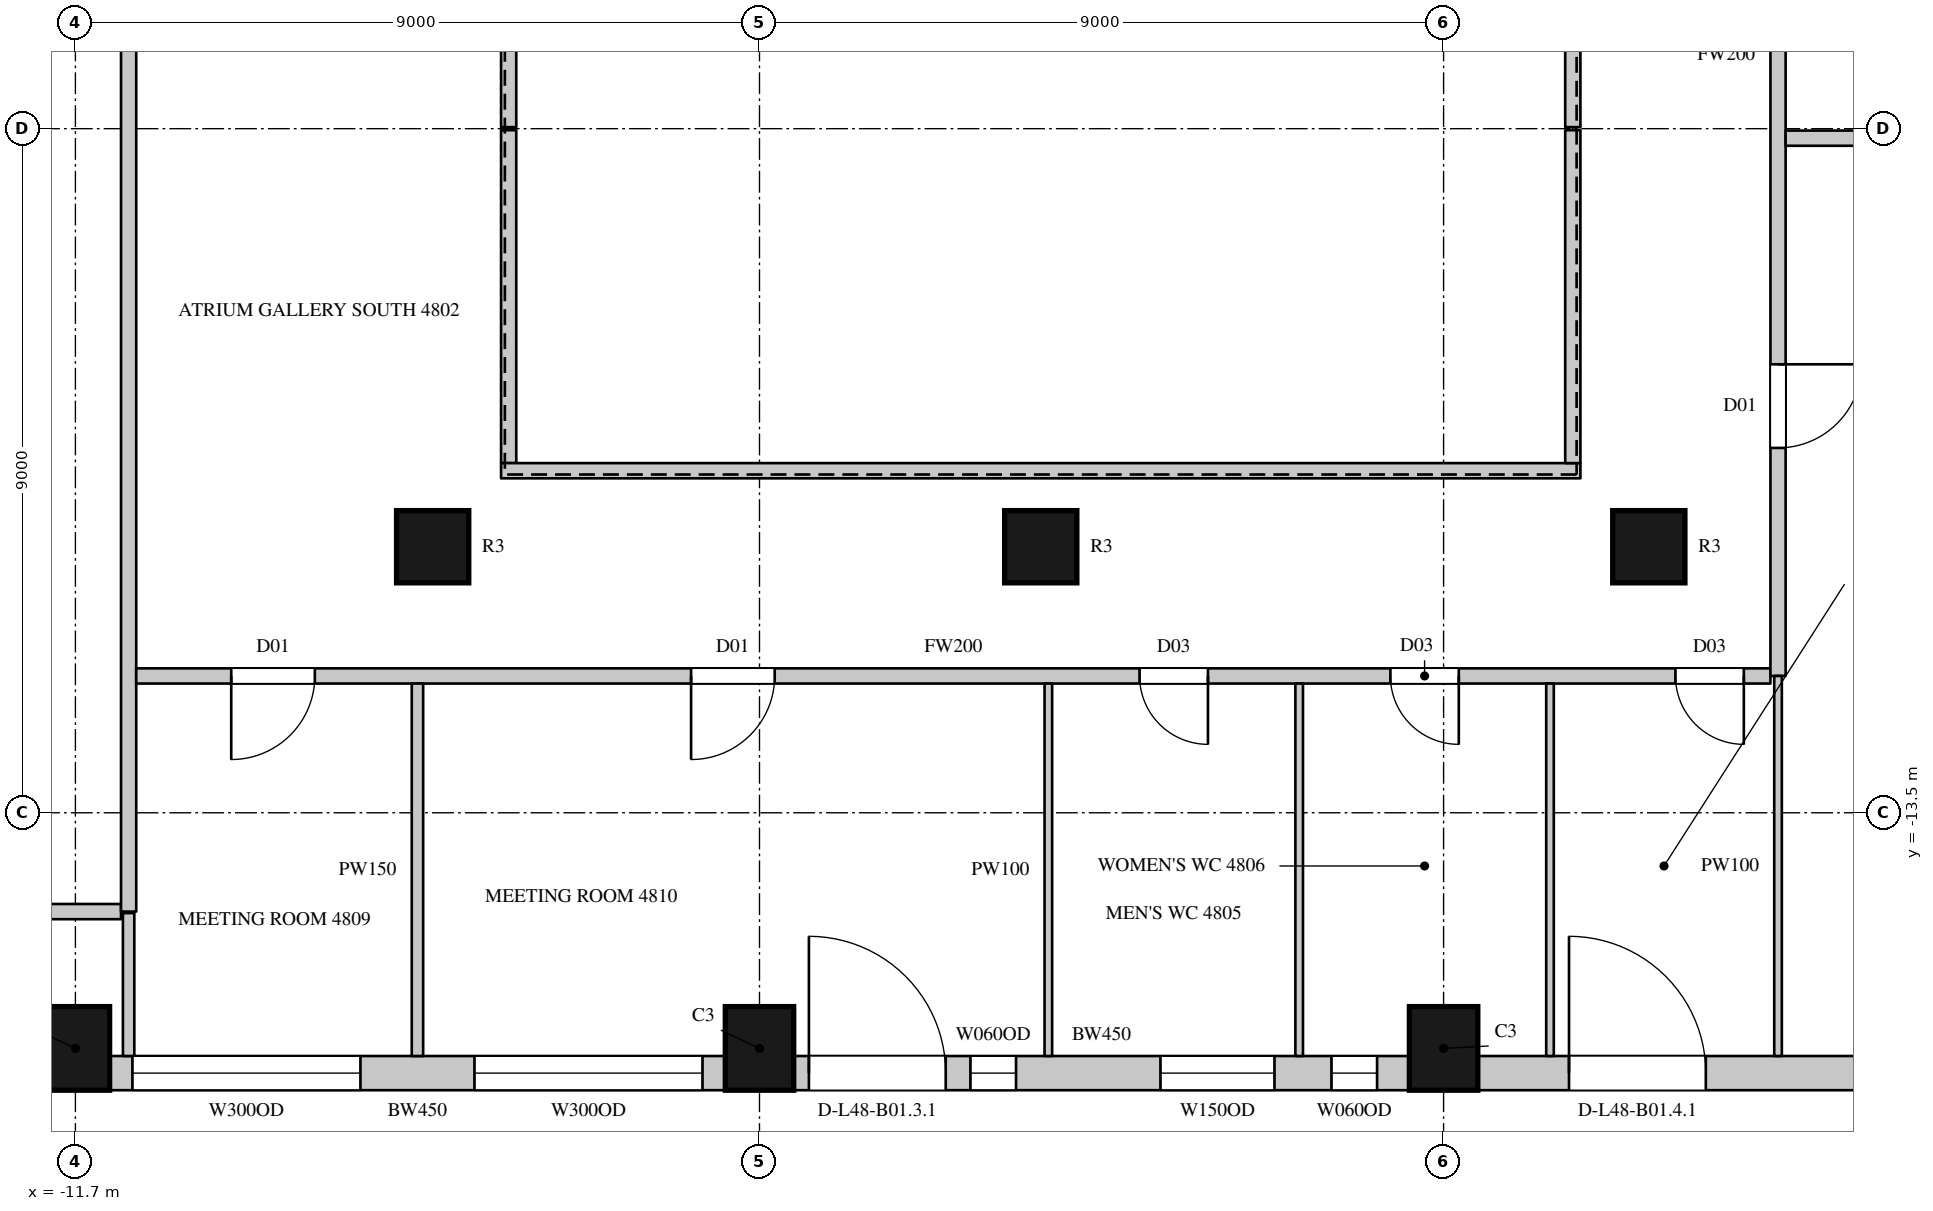
"""IFC4 building model, lengths in metres.
Left out: names, types, materials, properties, quantities, classifications, styles, units other than length and angle.
Written with IfcOpenShell. Run it as: python <this file> out.ifc"""

import sys

from ifc_helpers import new_model, si_unit, direction, frame, frame_2d, origin, origin_2d, place, context, subcontext, project, spatial, rectangle, circle, extrude, element, fill, save


model = new_model("IFC4")
c1 = context("Model", 3, precision=1e-05, world=origin(), true_north=direction((0.0, 1.0)))
c2 = subcontext(c1, "Body", "Model", "MODEL_VIEW")
j1 = project(units=[si_unit("LENGTHUNIT", "METRE"), si_unit("PLANEANGLEUNIT", "RADIAN")], contexts=[c1])
p1 = place(None, origin())
s1 = spatial("IfcSite", under=j1, at=p1, CompositionType="ELEMENT")
p2 = place(p1, origin())
s2 = spatial("IfcBuilding", under=s1, at=p2, CompositionType="ELEMENT")
p3 = place(p2, frame((0.0, 0.0, 217.9)))
s3 = spatial("IfcBuildingStorey", under=s2, at=p3, CompositionType="ELEMENT", Elevation=217.9)
for number, where, z_axis, x_axis in (
    (1, (-11.7, -16.6, 0.0), (0.0, 0.0, 1.0), (1.0, 0.0, 0.0)),
    (2, (-2.7, -16.6, 0.0), (0.0, 0.0, 1.0), (1.0, 0.0, 0.0)),
    (3, (6.3, -16.6, 0.0), (0.0, 0.0, 1.0), (1.0, 0.0, 0.0)),
):
    element("IfcColumn", number, at=place(p3, frame(where, z_axis=z_axis, x_axis=x_axis)), inside=s3, PredefinedType="COLUMN", context=c2, shape_type="SweptSolid", body=[
        extrude(rectangle(XDim=0.9, YDim=1.1, at=origin_2d()), origin(), (0.0, 0.0, 1.0), 4.1),
    ])
for number, where, z_axis, x_axis in (
    (4, (-7.0, -10.0, 0.0), (0.0, 0.0, 1.0), (1.0, 0.0, 0.0)),
    (5, (1.0, -10.0, 0.0), (0.0, 0.0, 1.0), (1.0, 0.0, 0.0)),
    (6, (9.0, -10.0, 0.0), (0.0, 0.0, 1.0), (1.0, 0.0, 0.0)),
):
    element("IfcColumn", number, at=place(p3, frame(where, z_axis=z_axis, x_axis=x_axis)), inside=s3, PredefinedType="COLUMN", context=c2, shape_type="SweptSolid", body=[
        extrude(circle(Radius=0.475, at=origin_2d()), origin(), (0.0, 0.0, 1.0), 4.1),
    ])
p4 = place(p3, frame((-11.25, -16.925, 0.0), z_axis=(0.0, 0.0, 1.0), x_axis=(1.0, 0.0, 0.0)))
e7 = element("IfcWall", 7, at=p4, inside=s3, PredefinedType="SOLIDWALL", context=c2, shape_type="SweptSolid", body=[
    extrude(rectangle(XDim=8.1, YDim=0.45, at=frame_2d((4.05, 0.0))), origin(), (0.0, 0.0, 1.0), 3.8),
])
p5 = place(p4, frame((0.3, 0.0, 1.05)))
e8 = element("IfcOpeningElement", 8, at=p5, cuts=e7, PredefinedType="OPENING", context=c2, shape_type="SweptSolid", body=[
    extrude(rectangle(XDim=3.0, YDim=2.4, at=frame_2d((1.5, 1.2))), frame((0.0, 0.235, 0.0), z_axis=(0.0, -1.0, 0.0), x_axis=(1.0, 0.0, 0.0)), (0.0, 0.0, 1.0), 0.47),
])
p6 = place(p4, frame((4.8, 0.0, 1.05)))
e9 = element("IfcOpeningElement", 9, at=p6, cuts=e7, PredefinedType="OPENING", context=c2, shape_type="SweptSolid", body=[
    extrude(rectangle(XDim=3.0, YDim=2.4, at=frame_2d((1.5, 1.2))), frame((0.0, 0.235, 0.0), z_axis=(0.0, -1.0, 0.0), x_axis=(1.0, 0.0, 0.0)), (0.0, 0.0, 1.0), 0.47),
])
p7 = place(p3, frame((-2.25, -16.925, 0.0), z_axis=(0.0, 0.0, 1.0), x_axis=(1.0, 0.0, 0.0)))
e10 = element("IfcWall", 10, at=p7, inside=s3, PredefinedType="SOLIDWALL", context=c2, shape_type="SweptSolid", body=[
    extrude(rectangle(XDim=8.1, YDim=0.45, at=frame_2d((4.05, 0.0))), origin(), (0.0, 0.0, 1.0), 3.8),
])
p8 = place(p7, frame((0.2, 0.0, 0.0)))
e11 = element("IfcOpeningElement", 11, at=p8, cuts=e10, PredefinedType="OPENING", context=c2, shape_type="SweptSolid", body=[
    extrude(rectangle(XDim=1.8, YDim=2.4, at=frame_2d((0.9, 1.2))), frame((0.0, 0.235, 0.0), z_axis=(0.0, -1.0, 0.0), x_axis=(1.0, 0.0, 0.0)), (0.0, 0.0, 1.0), 0.47),
])
p9 = place(p7, frame((2.325, 0.0, 1.05)))
e12 = element("IfcOpeningElement", 12, at=p9, cuts=e10, PredefinedType="OPENING", context=c2, shape_type="SweptSolid", body=[
    extrude(rectangle(XDim=0.6, YDim=2.4, at=frame_2d((0.3, 1.2))), frame((0.0, 0.235, 0.0), z_axis=(0.0, -1.0, 0.0), x_axis=(1.0, 0.0, 0.0)), (0.0, 0.0, 1.0), 0.47),
])
p10 = place(p7, frame((4.825, 0.0, 1.05)))
e13 = element("IfcOpeningElement", 13, at=p10, cuts=e10, PredefinedType="OPENING", context=c2, shape_type="SweptSolid", body=[
    extrude(rectangle(XDim=1.5, YDim=2.4, at=frame_2d((0.75, 1.2))), frame((0.0, 0.235, 0.0), z_axis=(0.0, -1.0, 0.0), x_axis=(1.0, 0.0, 0.0)), (0.0, 0.0, 1.0), 0.47),
])
p11 = place(p7, frame((7.075, 0.0, 1.05)))
e14 = element("IfcOpeningElement", 14, at=p11, cuts=e10, PredefinedType="OPENING", context=c2, shape_type="SweptSolid", body=[
    extrude(rectangle(XDim=0.6, YDim=2.4, at=frame_2d((0.3, 1.2))), frame((0.0, 0.235, 0.0), z_axis=(0.0, -1.0, 0.0), x_axis=(1.0, 0.0, 0.0)), (0.0, 0.0, 1.0), 0.47),
])
p12 = place(p3, frame((6.75, -16.925, 0.0), z_axis=(0.0, 0.0, 1.0), x_axis=(1.0, 0.0, 0.0)))
e15 = element("IfcWall", 15, at=p12, inside=s3, PredefinedType="SOLIDWALL", context=c2, shape_type="SweptSolid", body=[
    extrude(rectangle(XDim=6.414, YDim=0.45, at=frame_2d((3.207, 0.0))), origin(), (0.0, 0.0, 1.0), 3.8),
])
p13 = place(p12, frame((1.2, 0.0, 0.0)))
e16 = element("IfcOpeningElement", 16, at=p13, cuts=e15, PredefinedType="OPENING", context=c2, shape_type="SweptSolid", body=[
    extrude(rectangle(XDim=1.8, YDim=2.4, at=frame_2d((0.9, 1.2))), frame((0.0, 0.235, 0.0), z_axis=(0.0, -1.0, 0.0), x_axis=(1.0, 0.0, 0.0)), (0.0, 0.0, 1.0), 0.47),
])
p14 = place(p3, frame((-13.97, -14.8, 0.0), z_axis=(0.0, 0.0, 1.0), x_axis=(1.0, 0.0, 0.0)))
e17 = element("IfcWall", 17, at=p14, inside=s3, PredefinedType="PARTITIONING", context=c2, shape_type="SweptSolid", body=[
    extrude(rectangle(XDim=2.87, YDim=0.2, at=frame_2d((1.435, 0.0))), origin(), (0.0, 0.0, 1.0), 3.8),
])
p15 = place(p3, frame((-11.0, -14.8, 0.0), z_axis=(0.0, 0.0, 1.0), x_axis=(0.0, 1.0, 0.0)))
e18 = element("IfcWall", 18, at=p15, inside=s3, PredefinedType="PARTITIONING", context=c2, shape_type="SweptSolid", body=[
    extrude(rectangle(XDim=29.6, YDim=0.2, at=frame_2d((14.8, 0.0))), origin(), (0.0, 0.0, 1.0), 3.8),
])
p16 = place(p15, frame((17.9, 0.0, 0.0)))
e19 = element("IfcOpeningElement", 19, at=p16, cuts=e18, PredefinedType="OPENING", context=c2, shape_type="SweptSolid", body=[
    extrude(rectangle(XDim=1.5, YDim=2.4, at=frame_2d((0.75, 1.2))), frame((0.0, 0.11, 0.0), z_axis=(0.0, -1.0, 0.0), x_axis=(1.0, 0.0, 0.0)), (0.0, 0.0, 1.0), 0.22),
])
p17 = place(p3, frame((-10.9, -11.7, 0.0), z_axis=(0.0, 0.0, 1.0), x_axis=(1.0, 0.0, 0.0)))
e20 = element("IfcWall", 20, at=p17, inside=s3, PredefinedType="PARTITIONING", context=c2, shape_type="SweptSolid", body=[
    extrude(rectangle(XDim=21.5, YDim=0.2, at=frame_2d((10.75, 0.0))), origin(), (0.0, 0.0, 1.0), 3.8),
])
p18 = place(p17, frame((13.2, 0.0, 0.0)))
e21 = element("IfcOpeningElement", 21, at=p18, cuts=e20, PredefinedType="OPENING", context=c2, shape_type="SweptSolid", body=[
    extrude(rectangle(XDim=0.9, YDim=2.2, at=frame_2d((0.45, 1.1))), frame((0.0, 0.11, 0.0), z_axis=(0.0, -1.0, 0.0), x_axis=(1.0, 0.0, 0.0)), (0.0, 0.0, 1.0), 0.22),
])
p19 = place(p17, frame((16.5, 0.0, 0.0)))
e22 = element("IfcOpeningElement", 22, at=p19, cuts=e20, PredefinedType="OPENING", context=c2, shape_type="SweptSolid", body=[
    extrude(rectangle(XDim=0.9, YDim=2.2, at=frame_2d((0.45, 1.1))), frame((0.0, 0.11, 0.0), z_axis=(0.0, -1.0, 0.0), x_axis=(1.0, 0.0, 0.0)), (0.0, 0.0, 1.0), 0.22),
])
p20 = place(p17, frame((20.25, 0.0, 0.0)))
e23 = element("IfcOpeningElement", 23, at=p20, cuts=e20, PredefinedType="OPENING", context=c2, shape_type="SweptSolid", body=[
    extrude(rectangle(XDim=0.9, YDim=2.2, at=frame_2d((0.45, 1.1))), frame((0.0, 0.11, 0.0), z_axis=(0.0, -1.0, 0.0), x_axis=(1.0, 0.0, 0.0)), (0.0, 0.0, 1.0), 0.22),
])
p21 = place(p17, frame((1.25, 0.0, 0.0)))
e24 = element("IfcOpeningElement", 24, at=p21, cuts=e20, PredefinedType="OPENING", context=c2, shape_type="SweptSolid", body=[
    extrude(rectangle(XDim=1.1, YDim=2.4, at=frame_2d((0.55, 1.2))), frame((0.0, 0.11, 0.0), z_axis=(0.0, -1.0, 0.0), x_axis=(1.0, 0.0, 0.0)), (0.0, 0.0, 1.0), 0.22),
])
p22 = place(p17, frame((7.3, 0.0, 0.0)))
e25 = element("IfcOpeningElement", 25, at=p22, cuts=e20, PredefinedType="OPENING", context=c2, shape_type="SweptSolid", body=[
    extrude(rectangle(XDim=1.1, YDim=2.4, at=frame_2d((0.55, 1.2))), frame((0.0, 0.11, 0.0), z_axis=(0.0, -1.0, 0.0), x_axis=(1.0, 0.0, 0.0)), (0.0, 0.0, 1.0), 0.22),
])
p23 = place(p3, frame((-6.0, -8.9, 0.0), z_axis=(0.0, 0.0, 1.0), x_axis=(0.0, 1.0, 0.0)))
e26 = element("IfcWall", 26, at=p23, inside=s3, PredefinedType="PARTITIONING", context=c2, shape_type="SweptSolid", body=[
    extrude(rectangle(XDim=4.38, YDim=0.2, at=frame_2d((2.19, 0.0))), origin(), (0.0, 0.0, 1.0), 3.8),
])
p24 = place(p3, frame((-6.1, -9.0, 0.0), z_axis=(0.0, 0.0, 1.0), x_axis=(1.0, 0.0, 0.0)))
e27 = element("IfcWall", 27, at=p24, inside=s3, PredefinedType="PARTITIONING", context=c2, shape_type="SweptSolid", body=[
    extrude(rectangle(XDim=14.2, YDim=0.2, at=frame_2d((7.1, 0.0))), origin(), (0.0, 0.0, 1.0), 3.8),
])
p25 = place(p3, frame((-6.0, -4.48, 0.0), z_axis=(0.0, 0.0, 1.0), x_axis=(0.0, 1.0, 0.0)))
e28 = element("IfcWall", 28, at=p25, inside=s3, PredefinedType="PARTITIONING", context=c2, shape_type="SweptSolid", body=[
    extrude(rectangle(XDim=13.38, YDim=0.2, at=frame_2d((6.69, 0.0))), origin(), (0.0, 0.0, 1.0), 3.8),
])
p26 = place(p3, frame((8.0, -8.9, 0.0), z_axis=(0.0, 0.0, 1.0), x_axis=(0.0, 1.0, 0.0)))
e29 = element("IfcWall", 29, at=p26, inside=s3, PredefinedType="PARTITIONING", context=c2, shape_type="SweptSolid", body=[
    extrude(rectangle(XDim=4.38, YDim=0.2, at=frame_2d((2.19, 0.0))), origin(), (0.0, 0.0, 1.0), 3.8),
])
p27 = place(p3, frame((8.0, -4.48, 0.0), z_axis=(0.0, 0.0, 1.0), x_axis=(0.0, 1.0, 0.0)))
e30 = element("IfcWall", 30, at=p27, inside=s3, PredefinedType="PARTITIONING", context=c2, shape_type="SweptSolid", body=[
    extrude(rectangle(XDim=13.38, YDim=0.2, at=frame_2d((6.69, 0.0))), origin(), (0.0, 0.0, 1.0), 3.8),
])
p28 = place(p3, frame((10.7, -11.7, 0.0), z_axis=(0.0, 0.0, 1.0), x_axis=(0.0, 1.0, 0.0)))
e31 = element("IfcWall", 31, at=p28, inside=s3, PredefinedType="PARTITIONING", context=c2, shape_type="SweptSolid", body=[
    extrude(rectangle(XDim=16.345, YDim=0.2, at=frame_2d((8.172, 0.0))), origin(), (0.0, 0.0, 1.0), 3.8),
])
p29 = place(p28, frame((12.35, 0.0, 0.0)))
e32 = element("IfcOpeningElement", 32, at=p29, cuts=e31, PredefinedType="OPENING", context=c2, shape_type="SweptSolid", body=[
    extrude(rectangle(XDim=1.5, YDim=2.4, at=frame_2d((0.75, 1.2))), frame((0.0, 0.11, 0.0), z_axis=(0.0, -1.0, 0.0), x_axis=(1.0, 0.0, 0.0)), (0.0, 0.0, 1.0), 0.22),
])
p30 = place(p28, frame((3.0, 0.0, 0.0)))
e33 = element("IfcOpeningElement", 33, at=p30, cuts=e31, PredefinedType="OPENING", context=c2, shape_type="SweptSolid", body=[
    extrude(rectangle(XDim=1.1, YDim=2.4, at=frame_2d((0.55, 1.2))), frame((0.0, 0.11, 0.0), z_axis=(0.0, -1.0, 0.0), x_axis=(1.0, 0.0, 0.0)), (0.0, 0.0, 1.0), 0.22),
])
p31 = place(p3, frame((10.8, -4.625, 0.0), z_axis=(0.0, 0.0, 1.0), x_axis=(1.0, 0.0, 0.0)))
e34 = element("IfcWall", 34, at=p31, inside=s3, PredefinedType="PARTITIONING", context=c2, shape_type="SweptSolid", body=[
    extrude(rectangle(XDim=3.875, YDim=0.2, at=frame_2d((1.938, 0.0))), origin(), (0.0, 0.0, 1.0), 3.8),
])
p32 = place(p3, frame((-11.0, -16.7, 0.0), z_axis=(0.0, 0.0, 1.0), x_axis=(0.0, 1.0, 0.0)))
e35 = element("IfcWall", 35, at=p32, inside=s3, PredefinedType="PARTITIONING", context=c2, shape_type="SweptSolid", body=[
    extrude(rectangle(XDim=1.88, YDim=0.15, at=frame_2d((0.94, 0.0))), origin(), (0.0, 0.0, 1.0), 3.8),
])
p33 = place(p3, frame((-7.2, -16.7, 0.0), z_axis=(0.0, 0.0, 1.0), x_axis=(0.0, 1.0, 0.0)))
e36 = element("IfcWall", 36, at=p33, inside=s3, PredefinedType="PARTITIONING", context=c2, shape_type="SweptSolid", body=[
    extrude(rectangle(XDim=4.9, YDim=0.15, at=frame_2d((2.45, 0.0))), origin(), (0.0, 0.0, 1.0), 3.15),
])
for number, where, z_axis, x_axis in (
    (37, (1.1, -16.7, 0.0), (0.0, 0.0, 1.0), (0.0, 1.0, 0.0)),
    (38, (4.4, -16.7, 0.0), (0.0, 0.0, 1.0), (0.0, 1.0, 0.0)),
    (39, (7.7, -16.7, 0.0), (0.0, 0.0, 1.0), (0.0, 1.0, 0.0)),
):
    element("IfcWall", number, at=place(p3, frame(where, z_axis=z_axis, x_axis=x_axis)), inside=s3, PredefinedType="PARTITIONING", context=c2, shape_type="SweptSolid", body=[
        extrude(rectangle(XDim=4.9, YDim=0.1, at=frame_2d((2.45, 0.0))), origin(), (0.0, 0.0, 1.0), 3.8),
    ])
p34 = place(p3, frame((10.7, -16.7, 0.0), z_axis=(0.0, 0.0, 1.0), x_axis=(0.0, 1.0, 0.0)))
e40 = element("IfcWall", 40, at=p34, inside=s3, PredefinedType="PARTITIONING", context=c2, shape_type="SweptSolid", body=[
    extrude(rectangle(XDim=5.0, YDim=0.1, at=frame_2d((2.5, 0.0))), origin(), (0.0, 0.0, 1.0), 3.8),
])
p35 = place(p5, origin())
e41 = element("IfcWindow", 41, at=p35, inside=s3, PartitioningType="SINGLE_PANEL", PredefinedType="WINDOW", context=c2, shape_type="SweptSolid", body=[
    extrude(rectangle(XDim=3.0, YDim=2.4, at=frame_2d((1.5, 1.2))), frame((0.0, 0.135, 0.0), z_axis=(0.0, -1.0, 0.0), x_axis=(1.0, 0.0, 0.0)), (0.0, 0.0, 1.0), 0.06),
])
fill(e8, e41)
p36 = place(p6, origin())
e42 = element("IfcWindow", 42, at=p36, inside=s3, PartitioningType="SINGLE_PANEL", PredefinedType="WINDOW", context=c2, shape_type="SweptSolid", body=[
    extrude(rectangle(XDim=3.0, YDim=2.4, at=frame_2d((1.5, 1.2))), frame((0.0, 0.135, 0.0), z_axis=(0.0, -1.0, 0.0), x_axis=(1.0, 0.0, 0.0)), (0.0, 0.0, 1.0), 0.06),
])
fill(e9, e42)
p37 = place(p8, origin())
e43 = element("IfcDoor", 43, at=p37, inside=s3, OperationType="SLIDING_TO_LEFT", PredefinedType="DOOR", context=c2, shape_type="SweptSolid", body=[
    extrude(rectangle(XDim=1.8, YDim=2.4, at=frame_2d((0.9, 1.2))), frame((0.0, 0.13, 0.0), z_axis=(0.0, -1.0, 0.0), x_axis=(1.0, 0.0, 0.0)), (0.0, 0.0, 1.0), 0.05),
])
fill(e11, e43)
p38 = place(p13, origin())
e44 = element("IfcDoor", 44, at=p38, inside=s3, OperationType="SLIDING_TO_LEFT", PredefinedType="DOOR", context=c2, shape_type="SweptSolid", body=[
    extrude(rectangle(XDim=1.8, YDim=2.4, at=frame_2d((0.9, 1.2))), frame((0.0, 0.13, 0.0), z_axis=(0.0, -1.0, 0.0), x_axis=(1.0, 0.0, 0.0)), (0.0, 0.0, 1.0), 0.05),
])
fill(e16, e44)
p39 = place(p18, origin())
e45 = element("IfcDoor", 45, at=p39, inside=s3, OperationType="SINGLE_SWING_LEFT", PredefinedType="DOOR", context=c2, shape_type="SweptSolid", body=[
    extrude(rectangle(XDim=0.9, YDim=2.2, at=frame_2d((0.45, 1.1))), frame((0.0, 0.025, 0.0), z_axis=(0.0, -1.0, 0.0), x_axis=(1.0, 0.0, 0.0)), (0.0, 0.0, 1.0), 0.05),
])
fill(e21, e45)
p40 = place(p19, origin())
e46 = element("IfcDoor", 46, at=p40, inside=s3, OperationType="SINGLE_SWING_LEFT", PredefinedType="DOOR", context=c2, shape_type="SweptSolid", body=[
    extrude(rectangle(XDim=0.9, YDim=2.2, at=frame_2d((0.45, 1.1))), frame((0.0, 0.025, 0.0), z_axis=(0.0, -1.0, 0.0), x_axis=(1.0, 0.0, 0.0)), (0.0, 0.0, 1.0), 0.05),
])
fill(e22, e46)
p41 = place(p20, origin())
e47 = element("IfcDoor", 47, at=p41, inside=s3, OperationType="SINGLE_SWING_LEFT", PredefinedType="DOOR", context=c2, shape_type="SweptSolid", body=[
    extrude(rectangle(XDim=0.9, YDim=2.2, at=frame_2d((0.45, 1.1))), frame((0.0, 0.025, 0.0), z_axis=(0.0, -1.0, 0.0), x_axis=(1.0, 0.0, 0.0)), (0.0, 0.0, 1.0), 0.05),
])
fill(e23, e47)
p42 = place(p21, origin())
e48 = element("IfcDoor", 48, at=p42, inside=s3, OperationType="SINGLE_SWING_RIGHT", PredefinedType="DOOR", context=c2, shape_type="SweptSolid", body=[
    extrude(rectangle(XDim=1.1, YDim=2.4, at=frame_2d((0.55, 1.2))), frame((0.0, 0.025, 0.0), z_axis=(0.0, -1.0, 0.0), x_axis=(1.0, 0.0, 0.0)), (0.0, 0.0, 1.0), 0.05),
])
fill(e24, e48)
p43 = place(p22, origin())
e49 = element("IfcDoor", 49, at=p43, inside=s3, OperationType="SINGLE_SWING_RIGHT", PredefinedType="DOOR", context=c2, shape_type="SweptSolid", body=[
    extrude(rectangle(XDim=1.1, YDim=2.4, at=frame_2d((0.55, 1.2))), frame((0.0, 0.025, 0.0), z_axis=(0.0, -1.0, 0.0), x_axis=(1.0, 0.0, 0.0)), (0.0, 0.0, 1.0), 0.05),
])
fill(e25, e49)
p44 = place(p30, origin())
e50 = element("IfcDoor", 50, at=p44, inside=s3, OperationType="SINGLE_SWING_LEFT", PredefinedType="DOOR", context=c2, shape_type="SweptSolid", body=[
    extrude(rectangle(XDim=1.1, YDim=2.4, at=frame_2d((0.55, 1.2))), frame((0.0, 0.025, 0.0), z_axis=(0.0, -1.0, 0.0), x_axis=(1.0, 0.0, 0.0)), (0.0, 0.0, 1.0), 0.05),
])
fill(e33, e50)
p45 = place(p9, origin())
e51 = element("IfcWindow", 51, at=p45, inside=s3, PartitioningType="SINGLE_PANEL", PredefinedType="WINDOW", context=c2, shape_type="SweptSolid", body=[
    extrude(rectangle(XDim=0.6, YDim=2.4, at=frame_2d((0.3, 1.2))), frame((0.0, 0.135, 0.0), z_axis=(0.0, -1.0, 0.0), x_axis=(1.0, 0.0, 0.0)), (0.0, 0.0, 1.0), 0.06),
])
fill(e12, e51)
p46 = place(p10, origin())
e52 = element("IfcWindow", 52, at=p46, inside=s3, PartitioningType="SINGLE_PANEL", PredefinedType="WINDOW", context=c2, shape_type="SweptSolid", body=[
    extrude(rectangle(XDim=1.5, YDim=2.4, at=frame_2d((0.75, 1.2))), frame((0.0, 0.135, 0.0), z_axis=(0.0, -1.0, 0.0), x_axis=(1.0, 0.0, 0.0)), (0.0, 0.0, 1.0), 0.06),
])
fill(e13, e52)
p47 = place(p11, origin())
e53 = element("IfcWindow", 53, at=p47, inside=s3, PartitioningType="SINGLE_PANEL", PredefinedType="WINDOW", context=c2, shape_type="SweptSolid", body=[
    extrude(rectangle(XDim=0.6, YDim=2.4, at=frame_2d((0.3, 1.2))), frame((0.0, 0.135, 0.0), z_axis=(0.0, -1.0, 0.0), x_axis=(1.0, 0.0, 0.0)), (0.0, 0.0, 1.0), 0.06),
])
fill(e14, e53)
save(model, sys.argv[1])
